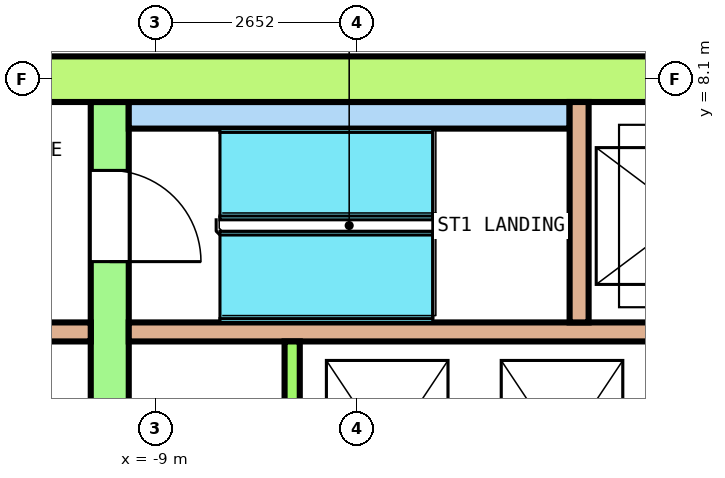
"""IFC4 building model, lengths in metres.
Left out: names, types, materials, properties, quantities, classifications, styles, units other than length and angle.
Written with IfcOpenShell. Run it as: python <this file> out.ifc"""

import sys

from ifc_helpers import new_model, si_unit, direction, frame, frame_2d, origin, place, context, subcontext, project, spatial, rectangle, extrude, element, fill, save


model = new_model("IFC4")
c1 = context("Model", 3, precision=1e-05, world=origin(), true_north=direction((0.0, 1.0)))
c2 = subcontext(c1, "Body", "Model", "MODEL_VIEW")
j1 = project(units=[si_unit("LENGTHUNIT", "METRE"), si_unit("PLANEANGLEUNIT", "RADIAN")], contexts=[c1])
p1 = place(None, origin())
s1 = spatial("IfcSite", under=j1, at=p1, CompositionType="ELEMENT")
p2 = place(p1, origin())
s2 = spatial("IfcBuilding", under=s1, at=p2, CompositionType="ELEMENT")
p3 = place(p2, frame((0.0, 0.0, 227.4)))
s3 = spatial("IfcBuildingStorey", under=s2, at=p3, CompositionType="ELEMENT", Elevation=227.4)
p4 = place(p3, frame((-13.5, 8.1, 0.0), z_axis=(0.0, 0.0, 1.0), x_axis=(1.0, 0.0, 0.0)))
e1 = element("IfcWall", 1, at=p4, inside=s3, PredefinedType="SHEAR", context=c2, shape_type="SweptSolid", body=[
    extrude(rectangle(XDim=27.0, YDim=0.6, at=frame_2d((13.5, 0.0))), origin(), (0.0, 0.0, 1.0), 3.7),
])
p5 = place(p4, frame((14.425, 0.0, 0.0)))
e2 = element("IfcOpeningElement", 2, at=p5, cuts=e1, PredefinedType="OPENING", context=c2, shape_type="SweptSolid", body=[
    extrude(rectangle(XDim=1.4, YDim=2.1, at=frame_2d((0.7, 1.05))), frame((0.0, 0.31, 0.0), z_axis=(0.0, -1.0, 0.0), x_axis=(1.0, 0.0, 0.0)), (0.0, 0.0, 1.0), 0.62),
])
p6 = place(p3, frame((-9.6, -7.8, 0.0), z_axis=(0.0, 0.0, 1.0), x_axis=(0.0, 1.0, 0.0)))
e3 = element("IfcWall", 3, at=p6, inside=s3, PredefinedType="SHEAR", context=c2, shape_type="SweptSolid", body=[
    extrude(rectangle(XDim=15.6, YDim=0.5, at=frame_2d((7.8, 0.0))), origin(), (0.0, 0.0, 1.0), 3.7),
])
p7 = place(p6, frame((6.6, 0.0, 0.0)))
e4 = element("IfcOpeningElement", 4, at=p7, cuts=e3, PredefinedType="OPENING", context=c2, shape_type="SweptSolid", body=[
    extrude(rectangle(XDim=2.4, YDim=2.1, at=frame_2d((1.2, 1.05))), frame((0.0, 0.26, 0.0), z_axis=(0.0, -1.0, 0.0), x_axis=(1.0, 0.0, 0.0)), (0.0, 0.0, 1.0), 0.52),
])
p8 = place(p6, frame((13.5, 0.0, 0.0)))
e5 = element("IfcOpeningElement", 5, at=p8, cuts=e3, PredefinedType="OPENING", context=c2, shape_type="SweptSolid", body=[
    extrude(rectangle(XDim=1.2, YDim=2.1, at=frame_2d((0.6, 1.05))), frame((0.0, 0.26, 0.0), z_axis=(0.0, -1.0, 0.0), x_axis=(1.0, 0.0, 0.0)), (0.0, 0.0, 1.0), 0.52),
])
p9 = place(p6, frame((0.9, 0.0, 0.0)))
e6 = element("IfcOpeningElement", 6, at=p9, cuts=e3, PredefinedType="OPENING", context=c2, shape_type="SweptSolid", body=[
    extrude(rectangle(XDim=1.2, YDim=2.1, at=frame_2d((0.6, 1.05))), frame((0.0, 0.26, 0.0), z_axis=(0.0, -1.0, 0.0), x_axis=(1.0, 0.0, 0.0)), (0.0, 0.0, 1.0), 0.52),
])
p10 = place(p3, frame((-12.9, 4.775, 0.0), z_axis=(0.0, 0.0, 1.0), x_axis=(1.0, 0.0, 0.0)))
e7 = element("IfcWall", 7, at=p10, inside=s3, PredefinedType="SOLIDWALL", context=c2, shape_type="SweptSolid", body=[
    extrude(rectangle(XDim=3.05, YDim=0.25, at=frame_2d((1.525, 0.0))), origin(), (0.0, 0.0, 1.0), 3.7),
])
p11 = place(p3, frame((-9.35, 4.775, 0.0), z_axis=(0.0, 0.0, 1.0), x_axis=(1.0, 0.0, 0.0)))
e8 = element("IfcWall", 8, at=p11, inside=s3, PredefinedType="SOLIDWALL", context=c2, shape_type="SweptSolid", body=[
    extrude(rectangle(XDim=18.7, YDim=0.25, at=frame_2d((9.35, 0.0))), origin(), (0.0, 0.0, 1.0), 3.7),
])
p12 = place(p3, frame((-7.2, 1.75, 0.0), z_axis=(0.0, 0.0, 1.0), x_axis=(0.0, 1.0, 0.0)))
e9 = element("IfcWall", 9, at=p12, inside=s3, PredefinedType="SOLIDWALL", context=c2, shape_type="SweptSolid", body=[
    extrude(rectangle(XDim=2.9, YDim=0.2, at=frame_2d((1.45, 0.0))), origin(), (0.0, 0.0, 1.0), 3.7),
])
p13 = place(p3, frame((-9.35, 7.625, 0.0), z_axis=(0.0, 0.0, 1.0), x_axis=(1.0, 0.0, 0.0)))
e10 = element("IfcWall", 10, at=p13, inside=s3, PredefinedType="SOLIDWALL", context=c2, shape_type="SweptSolid", body=[
    extrude(rectangle(XDim=5.8, YDim=0.35, at=frame_2d((2.9, 0.0))), origin(), (0.0, 0.0, 1.0), 3.7),
])
p14 = place(p3, frame((-3.425, 4.9, 0.0), z_axis=(0.0, 0.0, 1.0), x_axis=(0.0, 1.0, 0.0)))
e11 = element("IfcWall", 11, at=p14, inside=s3, PredefinedType="SOLIDWALL", context=c2, shape_type="SweptSolid", body=[
    extrude(rectangle(XDim=2.9, YDim=0.25, at=frame_2d((1.45, 0.0))), origin(), (0.0, 0.0, 1.0), 3.7),
])
p15 = place(p8, origin())
e12 = element("IfcDoor", 12, at=p15, inside=s3, OperationType="SINGLE_SWING_LEFT", PredefinedType="DOOR", context=c2, shape_type="SweptSolid", body=[
    extrude(rectangle(XDim=1.2, YDim=2.1, at=frame_2d((0.6, 1.05))), frame((0.0, 0.2, 0.0), z_axis=(0.0, -1.0, 0.0), x_axis=(1.0, 0.0, 0.0)), (0.0, 0.0, 1.0), 0.4),
])
fill(e5, e12)
save(model, sys.argv[1])
